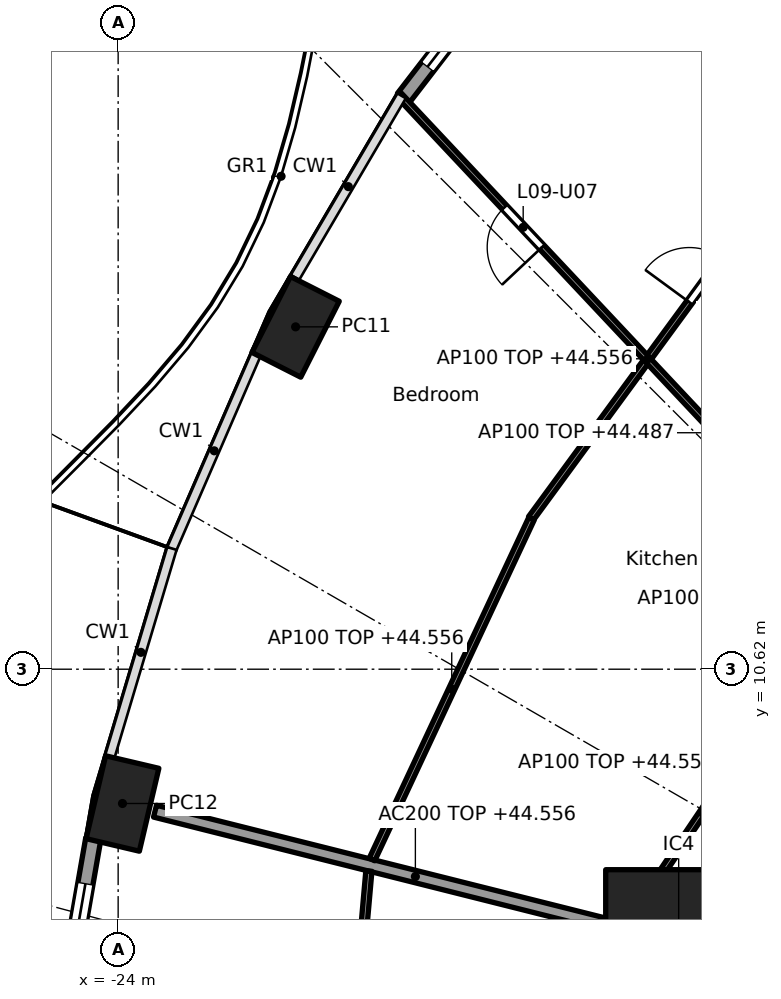
"""IFC4 building model, lengths in metres.
Left out: names, types, materials, properties, quantities, classifications, styles, units other than length and angle.
Written with IfcOpenShell. Run it as: python <this file> out.ifc"""

import sys

from ifc_helpers import new_model, si_unit, direction, frame, frame_2d, origin, origin_2d, place, context, subcontext, project, spatial, rectangle, hollow_rectangle, extrude, element, fill, save


model = new_model("IFC4")
c1 = context("Model", 3, precision=1e-05, world=origin(), true_north=direction((0.0, 1.0)))
c2 = subcontext(c1, "Body", "Model", "MODEL_VIEW")
j1 = project(units=[si_unit("LENGTHUNIT", "METRE"), si_unit("PLANEANGLEUNIT", "RADIAN")], contexts=[c1])
p1 = place(None, origin())
s1 = spatial("IfcSite", under=j1, at=p1, CompositionType="ELEMENT")
p2 = place(p1, origin())
s2 = spatial("IfcBuilding", under=s1, at=p2, CompositionType="ELEMENT")
p3 = place(p2, frame((0.0, 0.0, 41.8)))
s3 = spatial("IfcBuildingStorey", under=s2, at=p3, CompositionType="ELEMENT", Elevation=41.8)
for number, where, z_axis, x_axis in (
    (1, (-21.082, 16.25, 0.0), (0.0, 0.0, 1.0), (-0.452, -0.892, 0.0)),
    (2, (-23.929, 8.412, 0.0), (0.0, 0.0, 1.0), (-0.229, -0.973, 0.0)),
):
    element("IfcColumn", number, at=place(p3, frame(where, z_axis=z_axis, x_axis=x_axis)), inside=s3, PredefinedType="COLUMN", context=c2, shape_type="SweptSolid", body=[
        extrude(hollow_rectangle(XDim=1.4, YDim=0.9, WallThickness=0.05, at=origin_2d()), origin(), (0.0, 0.0, 1.0), 3.7),
    ])
p4 = place(p3, frame((-14.782, 6.123, 0.0), z_axis=(0.0, 0.0, 1.0), x_axis=(1.0, 0.0, 0.0)))
e3 = element("IfcColumn", 3, at=p4, inside=s3, PredefinedType="COLUMN", context=c2, shape_type="SweptSolid", body=[
    extrude(rectangle(XDim=2.4, YDim=2.4, at=origin_2d()), origin(), (0.0, 0.0, 1.0), 3.7),
])
p5 = place(p3, frame((-19.308, 20.013, 0.0), z_axis=(0.0, 0.0, 1.0), x_axis=(0.610457147657, 0.792049285635, 0.0)))
e4 = element("IfcWall", 4, at=p5, inside=s3, PredefinedType="SOLIDWALL", context=c2, shape_type="SweptSolid", body=[
    extrude(rectangle(XDim=3.397, YDim=0.25, at=frame_2d((1.699, 0.0))), origin(), (0.0, 0.0, 1.0), 3.44),
])
p6 = place(p5, frame((0.649, 0.0, 0.0)))
e5 = element("IfcOpeningElement", 5, at=p6, cuts=e4, PredefinedType="OPENING", context=c2, shape_type="SweptSolid", body=[
    extrude(rectangle(XDim=2.1, YDim=2.4, at=frame_2d((1.05, 1.2))), frame((0.0, 0.135, 0.0), z_axis=(0.0, -1.0, 0.0), x_axis=(1.0, 0.0, 0.0)), (0.0, 0.0, 1.0), 0.27),
])
p7 = place(p3, frame((-25.029, 4.286, 0.0), z_axis=(0.0, 0.0, 1.0), x_axis=(0.172217377323, 0.98505897029, 0.0)))
e6 = element("IfcWall", 6, at=p7, inside=s3, PredefinedType="SOLIDWALL", context=c2, shape_type="SweptSolid", body=[
    extrude(rectangle(XDim=3.598, YDim=0.25, at=frame_2d((1.799, 0.0))), origin(), (0.0, 0.0, 1.0), 3.44),
])
p8 = place(p7, frame((0.749, 0.0, 0.0)))
e7 = element("IfcOpeningElement", 7, at=p8, cuts=e6, PredefinedType="OPENING", context=c2, shape_type="SweptSolid", body=[
    extrude(rectangle(XDim=2.1, YDim=2.4, at=frame_2d((1.05, 1.2))), frame((0.0, 0.135, 0.0), z_axis=(0.0, -1.0, 0.0), x_axis=(1.0, 0.0, 0.0)), (0.0, 0.0, 1.0), 0.27),
])
p9 = place(p3, frame((-14.831, 6.135, 0.0), z_axis=(0.0, 0.0, 1.0), x_axis=(-0.969884949569, 0.243563512454, 0.0)))
e8 = element("IfcWall", 8, at=p9, inside=s3, PredefinedType="PARTITIONING", context=c2, shape_type="SweptSolid", body=[
    extrude(rectangle(XDim=8.829, YDim=0.2, at=frame_2d((4.415, 0.0))), origin(), (0.0, 0.0, 1.0), 2.756),
])
p10 = place(p3, frame((-13.362, 18.35, 0.0), z_axis=(0.0, 0.0, 1.0), x_axis=(-0.591191311491, -0.806531359104, 0.0)))
e9 = element("IfcWall", 9, at=p10, inside=s3, PredefinedType="PARTITIONING", context=c2, shape_type="SweptSolid", body=[
    extrude(rectangle(XDim=6.51, YDim=0.1, at=frame_2d((3.255, 0.0))), origin(), (0.0, 0.0, 1.0), 2.756),
])
p11 = place(p10, frame((1.202, 0.0, 0.0)))
e10 = element("IfcOpeningElement", 10, at=p11, cuts=e9, PredefinedType="OPENING", context=c2, shape_type="SweptSolid", body=[
    extrude(rectangle(XDim=0.9, YDim=2.1, at=frame_2d((0.45, 1.05))), frame((0.0, 0.06, 0.0), z_axis=(0.0, -1.0, 0.0), x_axis=(1.0, 0.0, 0.0)), (0.0, 0.0, 1.0), 0.12),
])
p12 = place(p3, frame((-8.953, 8.958, 0.0), z_axis=(0.0, 0.0, 1.0), x_axis=(-0.684574307023, 0.728943082939, 0.0)))
e11 = element("IfcWall", 11, at=p12, inside=s3, PredefinedType="PARTITIONING", context=c2, shape_type="SweptSolid", body=[
    extrude(rectangle(XDim=15.231, YDim=0.1, at=frame_2d((7.615, 0.0))), origin(), (0.0, 0.0, 1.0), 2.687),
])
p13 = place(p12, frame((1.54, 0.0, 0.0)))
e12 = element("IfcOpeningElement", 12, at=p13, cuts=e11, PredefinedType="OPENING", context=c2, shape_type="SweptSolid", body=[
    extrude(rectangle(XDim=0.9, YDim=2.1, at=frame_2d((0.45, 1.05))), frame((0.0, 0.06, 0.0), z_axis=(0.0, -1.0, 0.0), x_axis=(1.0, 0.0, 0.0)), (0.0, 0.0, 1.0), 0.12),
])
p14 = place(p12, frame((6.174, 0.0, 0.0)))
e13 = element("IfcOpeningElement", 13, at=p14, cuts=e11, PredefinedType="OPENING", context=c2, shape_type="SweptSolid", body=[
    extrude(rectangle(XDim=0.9, YDim=2.1, at=frame_2d((0.45, 1.05))), frame((0.0, 0.06, 0.0), z_axis=(0.0, -1.0, 0.0), x_axis=(1.0, 0.0, 0.0)), (0.0, 0.0, 1.0), 0.12),
])
p15 = place(p12, frame((11.8, 0.0, 0.0)))
e14 = element("IfcOpeningElement", 14, at=p15, cuts=e11, PredefinedType="OPENING", context=c2, shape_type="SweptSolid", body=[
    extrude(rectangle(XDim=0.9, YDim=2.1, at=frame_2d((0.45, 1.05))), frame((0.0, 0.06, 0.0), z_axis=(0.0, -1.0, 0.0), x_axis=(1.0, 0.0, 0.0)), (0.0, 0.0, 1.0), 0.12),
])
p16 = place(p3, frame((-13.162, 10.087, 0.0), z_axis=(0.0, 0.0, 1.0), x_axis=(-0.55912750241, -0.829081682375, 0.0)))
e15 = element("IfcWall", 15, at=p16, inside=s3, PredefinedType="PARTITIONING", context=c2, shape_type="SweptSolid", body=[
    extrude(rectangle(XDim=4.408, YDim=0.1, at=frame_2d((2.204, 0.0))), origin(), (0.0, 0.0, 1.0), 2.756),
])
p17 = place(p3, frame((-17.203, 13.095, 0.0), z_axis=(0.0, 0.0, 1.0), x_axis=(-0.423926333401, -0.905696673202, 0.0)))
e16 = element("IfcWall", 16, at=p17, inside=s3, PredefinedType="PARTITIONING", context=c2, shape_type="SweptSolid", body=[
    extrude(rectangle(XDim=6.188, YDim=0.1, at=frame_2d((3.094, 0.0))), origin(), (0.0, 0.0, 1.0), 2.756),
])
p18 = place(p3, frame((-19.877, 7.301, 0.0), z_axis=(0.0, 0.0, 1.0), x_axis=(-0.088143415068, -0.996107794558, 0.0)))
e17 = element("IfcWall", 17, at=p18, inside=s3, PredefinedType="PARTITIONING", context=c2, shape_type="SweptSolid", body=[
    extrude(rectangle(XDim=7.279, YDim=0.1, at=frame_2d((3.64, 0.0))), origin(), (0.0, 0.0, 1.0), 2.756),
])
p19 = place(p6, origin())
e18 = element("IfcDoor", 18, at=p19, inside=s3, OperationType="SLIDING_TO_LEFT", PredefinedType="DOOR", context=c2, shape_type="SweptSolid", body=[
    extrude(rectangle(XDim=2.1, YDim=2.4, at=frame_2d((1.05, 1.2))), frame((0.0, 0.025, 0.0), z_axis=(0.0, -1.0, 0.0), x_axis=(1.0, 0.0, 0.0)), (0.0, 0.0, 1.0), 0.05),
])
fill(e5, e18)
p20 = place(p8, origin())
e19 = element("IfcDoor", 19, at=p20, inside=s3, OperationType="SLIDING_TO_LEFT", PredefinedType="DOOR", context=c2, shape_type="SweptSolid", body=[
    extrude(rectangle(XDim=2.1, YDim=2.4, at=frame_2d((1.05, 1.2))), frame((0.0, 0.025, 0.0), z_axis=(0.0, -1.0, 0.0), x_axis=(1.0, 0.0, 0.0)), (0.0, 0.0, 1.0), 0.05),
])
fill(e7, e19)
p21 = place(p11, frame((0.9, 0.0, 0.0), x_axis=(-1.0, 0.0, 0.0)))
e20 = element("IfcDoor", 20, at=p21, inside=s3, OperationType="SINGLE_SWING_LEFT", PredefinedType="DOOR", context=c2, shape_type="SweptSolid", body=[
    extrude(rectangle(XDim=0.9, YDim=2.1, at=frame_2d((0.45, 1.05))), frame((0.0, 0.025, 0.0), z_axis=(0.0, -1.0, 0.0), x_axis=(1.0, 0.0, 0.0)), (0.0, 0.0, 1.0), 0.05),
])
fill(e10, e20)
p22 = place(p15, origin())
e21 = element("IfcDoor", 21, at=p22, inside=s3, OperationType="SINGLE_SWING_LEFT", PredefinedType="DOOR", context=c2, shape_type="SweptSolid", body=[
    extrude(rectangle(XDim=0.9, YDim=2.1, at=frame_2d((0.45, 1.05))), frame((0.0, 0.025, 0.0), z_axis=(0.0, -1.0, 0.0), x_axis=(1.0, 0.0, 0.0)), (0.0, 0.0, 1.0), 0.05),
])
fill(e14, e21)
save(model, sys.argv[1])
